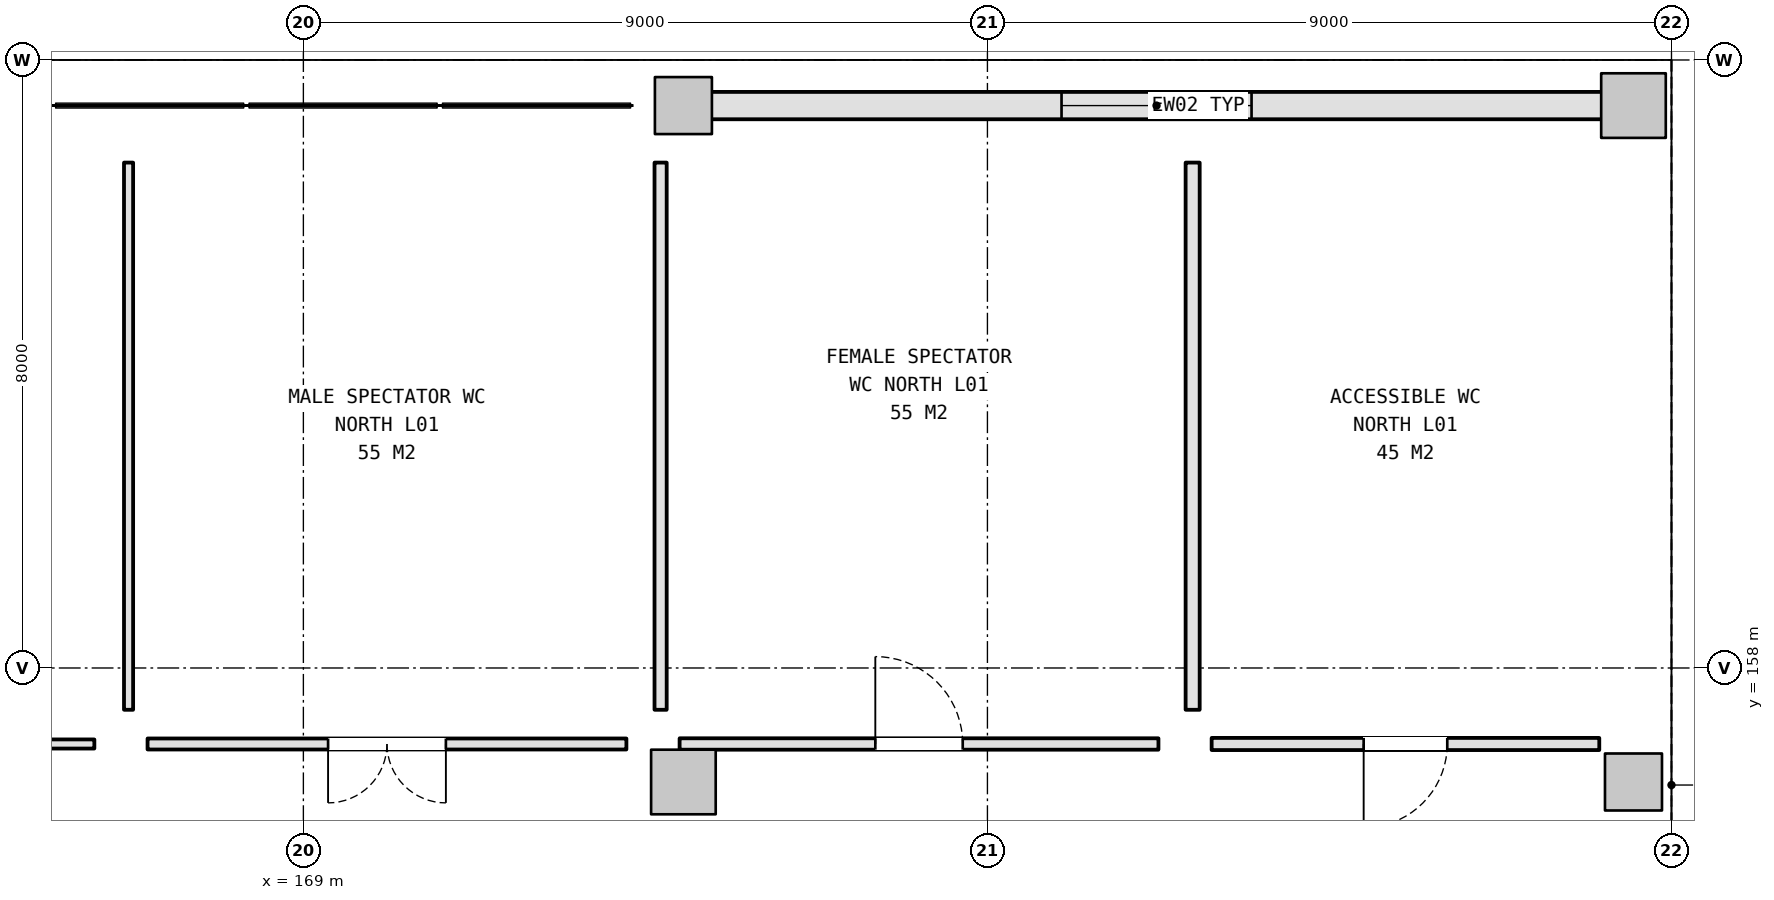
"""IFC4 building model, lengths in metres.
Left out: names, types, materials, properties, quantities, classifications, styles, units other than length and angle.
Written with IfcOpenShell. Run it as: python <this file> out.ifc"""

import sys

from ifc_helpers import new_model, si_unit, direction, frame, frame_2d, origin, origin_2d, place, context, subcontext, project, spatial, rectangle, extrude, element, fill, save


model = new_model("IFC4")
c1 = context("Model", 3, precision=1e-05, world=origin(), true_north=direction((0.0, 1.0)))
c2 = subcontext(c1, "Body", "Model", "MODEL_VIEW")
j1 = project(units=[si_unit("LENGTHUNIT", "METRE"), si_unit("PLANEANGLEUNIT", "RADIAN")], contexts=[c1])
p1 = place(None, origin())
s1 = spatial("IfcSite", under=j1, at=p1, CompositionType="ELEMENT")
p2 = place(p1, origin())
s2 = spatial("IfcBuilding", under=s1, at=p2, CompositionType="ELEMENT")
p3 = place(p2, frame((0.0, 0.0, 5.4)))
s3 = spatial("IfcBuildingStorey", under=s2, at=p3, CompositionType="ELEMENT", Elevation=5.4)
p4 = place(p3, frame((174.0, 156.5, 0.0), z_axis=(0.0, 0.0, 1.0), x_axis=(1.0, 0.0, 0.0)))
e1 = element("IfcColumn", 1, at=p4, inside=s3, PredefinedType="COLUMN", context=c2, shape_type="SweptSolid", body=[
    extrude(rectangle(XDim=0.85, YDim=0.85, at=origin_2d()), origin(), (0.0, 0.0, 1.0), 5.4),
])
for number, where, z_axis, x_axis in (
    (2, (174.0, 165.4, 0.0), (0.0, 0.0, 1.0), (1.0, 0.0, 0.0)),
    (3, (186.5, 156.5, 0.0), (0.0, 0.0, 1.0), (1.0, 0.0, 0.0)),
):
    element("IfcColumn", number, at=place(p3, frame(where, z_axis=z_axis, x_axis=x_axis)), inside=s3, PredefinedType="COLUMN", context=c2, shape_type="SweptSolid", body=[
        extrude(rectangle(XDim=0.75, YDim=0.75, at=origin_2d()), origin(), (0.0, 0.0, 1.0), 5.4),
    ])
p5 = place(p3, frame((186.5, 165.4, 0.0), z_axis=(0.0, 0.0, 1.0), x_axis=(1.0, 0.0, 0.0)))
e4 = element("IfcColumn", 4, at=p5, inside=s3, PredefinedType="COLUMN", context=c2, shape_type="SweptSolid", body=[
    extrude(rectangle(XDim=0.85, YDim=0.85, at=origin_2d()), origin(), (0.0, 0.0, 1.0), 5.4),
])
p6 = place(p3, frame((174.363, 165.4, 0.0), z_axis=(0.0, 0.0, 1.0), x_axis=(1.0, 0.0, 0.0)))
e5 = element("IfcWall", 5, at=p6, inside=s3, PredefinedType="SOLIDWALL", context=c2, shape_type="SweptSolid", body=[
    extrude(rectangle(XDim=11.724, YDim=0.36, at=frame_2d((5.862, 0.0))), origin(), (0.0, 0.0, 1.0), 4.475),
])
p7 = place(p6, frame((4.612, 0.0, 1.05)))
e6 = element("IfcOpeningElement", 6, at=p7, cuts=e5, PredefinedType="OPENING", context=c2, shape_type="SweptSolid", body=[
    extrude(rectangle(XDim=2.5, YDim=2.0, at=frame_2d((1.25, 1.0))), frame((0.0, 0.19, 0.0), z_axis=(0.0, -1.0, 0.0), x_axis=(1.0, 0.0, 0.0)), (0.0, 0.0, 1.0), 0.38),
])
p8 = place(p3, frame((166.25, 157.0, 0.0), z_axis=(0.0, 0.0, 1.0), x_axis=(-1.0, 0.0, 0.0)))
e7 = element("IfcWall", 7, at=p8, inside=s3, PredefinedType="PARTITIONING", context=c2, shape_type="SweptSolid", body=[
    extrude(rectangle(XDim=19.3, YDim=0.12, at=frame_2d((9.65, 0.0))), origin(), (0.0, 0.0, 1.0), 4.525),
])
p9 = place(p8, frame((9.11, 0.0, 0.0)))
e8 = element("IfcOpeningElement", 8, at=p9, cuts=e7, PredefinedType="OPENING", context=c2, shape_type="SweptSolid", body=[
    extrude(rectangle(XDim=1.08, YDim=2.25, at=frame_2d((0.54, 1.125))), frame((0.0, 0.07, 0.0), z_axis=(0.0, -1.0, 0.0), x_axis=(1.0, 0.0, 0.0)), (0.0, 0.0, 1.0), 0.14),
])
p10 = place(p3, frame((173.25, 157.0, 0.0), z_axis=(0.0, 0.0, 1.0), x_axis=(-1.0, 0.0, 0.0)))
e9 = element("IfcWall", 9, at=p10, inside=s3, PredefinedType="PARTITIONING", context=c2, shape_type="SweptSolid", body=[
    extrude(rectangle(XDim=6.3, YDim=0.145, at=frame_2d((3.15, 0.0))), origin(), (0.0, 0.0, 1.0), 5.12),
])
p11 = place(p10, frame((2.375, 0.0, 0.0)))
e10 = element("IfcOpeningElement", 10, at=p11, cuts=e9, PredefinedType="OPENING", context=c2, shape_type="SweptSolid", body=[
    extrude(rectangle(XDim=1.55, YDim=2.15, at=frame_2d((0.775, 1.075))), frame((0.0, 0.083, 0.0), z_axis=(0.0, -1.0, 0.0), x_axis=(1.0, 0.0, 0.0)), (0.0, 0.0, 1.0), 0.165),
])
p12 = place(p3, frame((166.7, 157.45, 0.0), z_axis=(0.0, 0.0, 1.0), x_axis=(0.0, 1.0, 0.0)))
e11 = element("IfcWall", 11, at=p12, inside=s3, PredefinedType="PARTITIONING", context=c2, shape_type="SweptSolid", body=[
    extrude(rectangle(XDim=7.2, YDim=0.12, at=frame_2d((3.6, 0.0))), origin(), (0.0, 0.0, 1.0), 4.675),
])
p13 = place(p3, frame((180.25, 157.0, 0.0), z_axis=(0.0, 0.0, 1.0), x_axis=(-1.0, 0.0, 0.0)))
e12 = element("IfcWall", 12, at=p13, inside=s3, PredefinedType="PARTITIONING", context=c2, shape_type="SweptSolid", body=[
    extrude(rectangle(XDim=6.3, YDim=0.15, at=frame_2d((3.15, 0.0))), origin(), (0.0, 0.0, 1.0), 4.525),
])
p14 = place(p13, frame((2.575, 0.0, 0.0)))
e13 = element("IfcOpeningElement", 13, at=p14, cuts=e12, PredefinedType="OPENING", context=c2, shape_type="SweptSolid", body=[
    extrude(rectangle(XDim=1.15, YDim=2.2, at=frame_2d((0.575, 1.1))), frame((0.0, 0.085, 0.0), z_axis=(0.0, -1.0, 0.0), x_axis=(1.0, 0.0, 0.0)), (0.0, 0.0, 1.0), 0.17),
])
p15 = place(p3, frame((173.7, 157.45, 0.0), z_axis=(0.0, 0.0, 1.0), x_axis=(0.0, 1.0, 0.0)))
e14 = element("IfcWall", 14, at=p15, inside=s3, PredefinedType="PARTITIONING", context=c2, shape_type="SweptSolid", body=[
    extrude(rectangle(XDim=7.2, YDim=0.16, at=frame_2d((3.6, 0.0))), origin(), (0.0, 0.0, 1.0), 4.525),
])
p16 = place(p3, frame((186.05, 157.0, 0.0), z_axis=(0.0, 0.0, 1.0), x_axis=(-1.0, 0.0, 0.0)))
e15 = element("IfcWall", 15, at=p16, inside=s3, PredefinedType="PARTITIONING", context=c2, shape_type="SweptSolid", body=[
    extrude(rectangle(XDim=5.1, YDim=0.16, at=frame_2d((2.55, 0.0))), origin(), (0.0, 0.0, 1.0), 5.12),
])
p17 = place(p16, frame((2.0, 0.0, 0.0)))
e16 = element("IfcOpeningElement", 16, at=p17, cuts=e15, PredefinedType="OPENING", context=c2, shape_type="SweptSolid", body=[
    extrude(rectangle(XDim=1.1, YDim=2.15, at=frame_2d((0.55, 1.075))), frame((0.0, 0.09, 0.0), z_axis=(0.0, -1.0, 0.0), x_axis=(1.0, 0.0, 0.0)), (0.0, 0.0, 1.0), 0.18),
])
p18 = place(p3, frame((180.7, 157.45, 0.0), z_axis=(0.0, 0.0, 1.0), x_axis=(0.0, 1.0, 0.0)))
e17 = element("IfcWall", 17, at=p18, inside=s3, PredefinedType="PARTITIONING", context=c2, shape_type="SweptSolid", body=[
    extrude(rectangle(XDim=7.2, YDim=0.185, at=frame_2d((3.6, 0.0))), origin(), (0.0, 0.0, 1.0), 4.675),
])
p19 = place(p7, origin())
e18 = element("IfcWindow", 18, at=p19, inside=s3, PartitioningType="SINGLE_PANEL", PredefinedType="WINDOW", context=c2, shape_type="SweptSolid", body=[
    extrude(rectangle(XDim=2.5, YDim=2.0, at=frame_2d((1.25, 1.0))), frame((0.0, 0.03, 0.0), z_axis=(0.0, -1.0, 0.0), x_axis=(1.0, 0.0, 0.0)), (0.0, 0.0, 1.0), 0.06),
])
fill(e6, e18)
p20 = place(p11, origin())
e19 = element("IfcDoor", 19, at=p20, inside=s3, OperationType="DOUBLE_DOOR_SINGLE_SWING", PredefinedType="DOOR", context=c2, shape_type="SweptSolid", body=[
    extrude(rectangle(XDim=1.55, YDim=2.15, at=frame_2d((0.775, 1.075))), frame((0.0, 0.025, 0.0), z_axis=(0.0, -1.0, 0.0), x_axis=(1.0, 0.0, 0.0)), (0.0, 0.0, 1.0), 0.05),
])
fill(e10, e19)
p21 = place(p14, frame((1.15, 0.0, 0.0), z_axis=(0.0, 0.0, 1.0), x_axis=(-1.0, 0.0, 0.0)))
e20 = element("IfcDoor", 20, at=p21, inside=s3, OperationType="SINGLE_SWING_RIGHT", PredefinedType="DOOR", context=c2, shape_type="SweptSolid", body=[
    extrude(rectangle(XDim=1.15, YDim=2.2, at=frame_2d((0.575, 1.1))), frame((0.0, 0.025, 0.0), z_axis=(0.0, -1.0, 0.0), x_axis=(1.0, 0.0, 0.0)), (0.0, 0.0, 1.0), 0.05),
])
fill(e13, e20)
p22 = place(p17, origin())
e21 = element("IfcDoor", 21, at=p22, inside=s3, OperationType="SINGLE_SWING_RIGHT", PredefinedType="DOOR", context=c2, shape_type="SweptSolid", body=[
    extrude(rectangle(XDim=1.1, YDim=2.15, at=frame_2d((0.55, 1.075))), frame((0.0, 0.025, 0.0), z_axis=(0.0, -1.0, 0.0), x_axis=(1.0, 0.0, 0.0)), (0.0, 0.0, 1.0), 0.05),
])
fill(e16, e21)
save(model, sys.argv[1])
